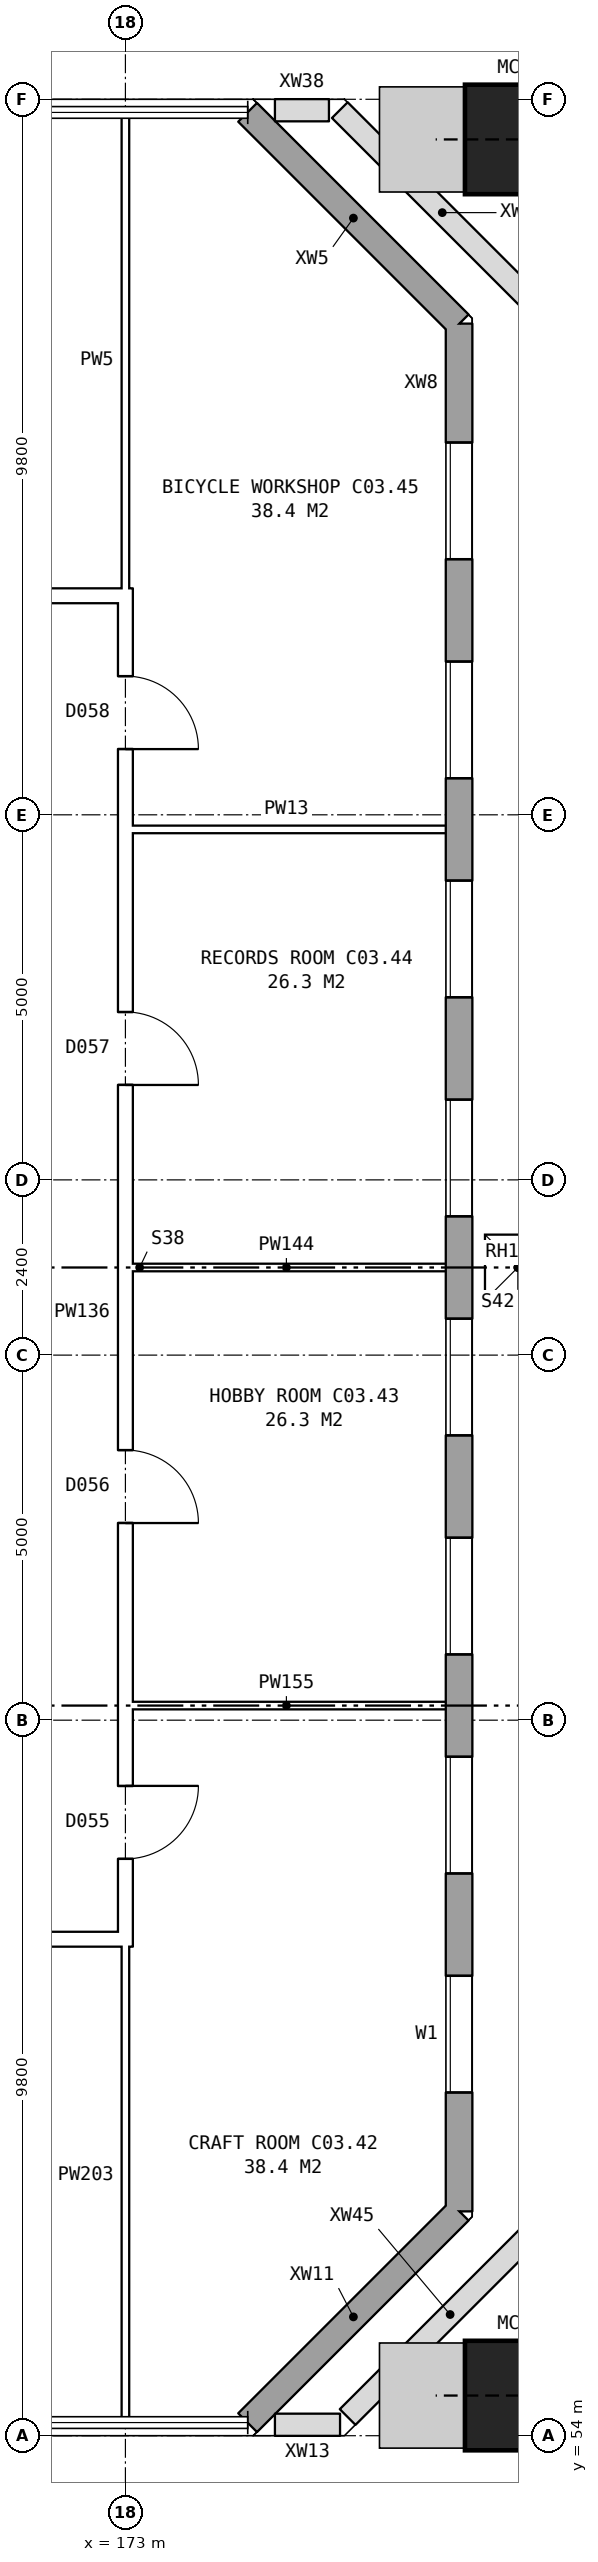
"""IFC4 building model, lengths in metres.
Left out: names, types, materials, properties, quantities, classifications, styles, units other than length and angle.
Written with IfcOpenShell. Run it as: python <this file> out.ifc"""

import sys

from ifc_helpers import new_model, si_unit, direction, frame, frame_2d, origin, origin_2d, place, context, subcontext, project, spatial, rectangle, hollow_rectangle, extrude, element, fill, save


model = new_model("IFC4")
c1 = context("Model", 3, precision=1e-05, world=origin(), true_north=direction((0.0, 1.0)))
c2 = subcontext(c1, "Body", "Model", "MODEL_VIEW")
j1 = project(units=[si_unit("LENGTHUNIT", "METRE"), si_unit("PLANEANGLEUNIT", "RADIAN")], contexts=[c1])
p1 = place(None, origin())
s1 = spatial("IfcSite", under=j1, at=p1, CompositionType="ELEMENT")
p2 = place(p1, origin())
s2 = spatial("IfcBuilding", under=s1, at=p2, CompositionType="ELEMENT")
p3 = place(p2, frame((0.0, 0.0, 14.7)))
s3 = spatial("IfcBuildingStorey", under=s2, at=p3, CompositionType="ELEMENT", Elevation=14.7)
for number, where, z_axis, x_axis in (
    (1, (178.401, 54.55, 0.189), (-0.252, 0.0, 0.968), (0.0, -1.0, 0.0)),
    (2, (178.401, 85.45, 0.189), (-0.252, 0.0, 0.968), (0.0, -1.0, 0.0)),
):
    element("IfcColumn", number, at=place(p3, frame(where, z_axis=z_axis, x_axis=x_axis)), inside=s3, PredefinedType="COLUMN", context=c2, shape_type="SweptSolid", body=[
        extrude(hollow_rectangle(XDim=1.5, YDim=1.5, WallThickness=0.08, at=origin_2d()), origin(), (0.0, 0.0, 1.0), 4.57),
    ])
p4 = place(p3, frame((174.675, 54.18, 0.0), z_axis=(0.0, 0.0, 1.0), x_axis=(0.707106781187, 0.707106781187, 0.0)))
e3 = element("IfcWall", 3, at=p4, inside=s3, PredefinedType="STANDARD", context=c2, shape_type="SweptSolid", body=[
    extrude(rectangle(XDim=4.094, YDim=0.36, at=frame_2d((2.047, 0.0))), origin(), (0.0, 0.0, 1.0), 4.0),
])
p5 = place(p3, frame((177.57, 57.075, 0.0), z_axis=(0.0, 0.0, 1.0), x_axis=(0.0, 1.0, 0.0)))
e4 = element("IfcWall", 4, at=p5, inside=s3, PredefinedType="STANDARD", context=c2, shape_type="SweptSolid", body=[
    extrude(rectangle(XDim=25.851, YDim=0.36, at=frame_2d((12.925, 0.0))), origin(), (0.0, 0.0, 1.0), 4.0),
])
p6 = place(p5, frame((1.625, 0.0, 0.8)))
e5 = element("IfcOpeningElement", 5, at=p6, cuts=e4, PredefinedType="OPENING", context=c2, shape_type="SweptSolid", body=[
    extrude(rectangle(XDim=1.6, YDim=1.8, at=frame_2d((0.8, 0.9))), frame((0.0, 0.19, 0.0), z_axis=(0.0, -1.0, 0.0), x_axis=(1.0, 0.0, 0.0)), (0.0, 0.0, 1.0), 0.38),
])
p7 = place(p5, frame((4.625, 0.0, 0.8)))
e6 = element("IfcOpeningElement", 6, at=p7, cuts=e4, PredefinedType="OPENING", context=c2, shape_type="SweptSolid", body=[
    extrude(rectangle(XDim=1.6, YDim=1.8, at=frame_2d((0.8, 0.9))), frame((0.0, 0.19, 0.0), z_axis=(0.0, -1.0, 0.0), x_axis=(1.0, 0.0, 0.0)), (0.0, 0.0, 1.0), 0.38),
])
p8 = place(p5, frame((7.625, 0.0, 0.8)))
e7 = element("IfcOpeningElement", 7, at=p8, cuts=e4, PredefinedType="OPENING", context=c2, shape_type="SweptSolid", body=[
    extrude(rectangle(XDim=1.6, YDim=1.8, at=frame_2d((0.8, 0.9))), frame((0.0, 0.19, 0.0), z_axis=(0.0, -1.0, 0.0), x_axis=(1.0, 0.0, 0.0)), (0.0, 0.0, 1.0), 0.38),
])
p9 = place(p5, frame((10.625, 0.0, 0.8)))
e8 = element("IfcOpeningElement", 8, at=p9, cuts=e4, PredefinedType="OPENING", context=c2, shape_type="SweptSolid", body=[
    extrude(rectangle(XDim=1.6, YDim=1.8, at=frame_2d((0.8, 0.9))), frame((0.0, 0.19, 0.0), z_axis=(0.0, -1.0, 0.0), x_axis=(1.0, 0.0, 0.0)), (0.0, 0.0, 1.0), 0.38),
])
p10 = place(p5, frame((13.625, 0.0, 0.8)))
e9 = element("IfcOpeningElement", 9, at=p10, cuts=e4, PredefinedType="OPENING", context=c2, shape_type="SweptSolid", body=[
    extrude(rectangle(XDim=1.6, YDim=1.8, at=frame_2d((0.8, 0.9))), frame((0.0, 0.19, 0.0), z_axis=(0.0, -1.0, 0.0), x_axis=(1.0, 0.0, 0.0)), (0.0, 0.0, 1.0), 0.38),
])
p11 = place(p5, frame((16.625, 0.0, 0.8)))
e10 = element("IfcOpeningElement", 10, at=p11, cuts=e4, PredefinedType="OPENING", context=c2, shape_type="SweptSolid", body=[
    extrude(rectangle(XDim=1.6, YDim=1.8, at=frame_2d((0.8, 0.9))), frame((0.0, 0.19, 0.0), z_axis=(0.0, -1.0, 0.0), x_axis=(1.0, 0.0, 0.0)), (0.0, 0.0, 1.0), 0.38),
])
p12 = place(p5, frame((19.625, 0.0, 0.8)))
e11 = element("IfcOpeningElement", 11, at=p12, cuts=e4, PredefinedType="OPENING", context=c2, shape_type="SweptSolid", body=[
    extrude(rectangle(XDim=1.6, YDim=1.8, at=frame_2d((0.8, 0.9))), frame((0.0, 0.19, 0.0), z_axis=(0.0, -1.0, 0.0), x_axis=(1.0, 0.0, 0.0)), (0.0, 0.0, 1.0), 0.38),
])
p13 = place(p5, frame((22.625, 0.0, 0.8)))
e12 = element("IfcOpeningElement", 12, at=p13, cuts=e4, PredefinedType="OPENING", context=c2, shape_type="SweptSolid", body=[
    extrude(rectangle(XDim=1.6, YDim=1.8, at=frame_2d((0.8, 0.9))), frame((0.0, 0.19, 0.0), z_axis=(0.0, -1.0, 0.0), x_axis=(1.0, 0.0, 0.0)), (0.0, 0.0, 1.0), 0.38),
])
p14 = place(p3, frame((177.57, 82.925, 0.0), z_axis=(0.0, 0.0, 1.0), x_axis=(-0.707106781187, 0.707106781187, 0.0)))
e13 = element("IfcWall", 13, at=p14, inside=s3, PredefinedType="STANDARD", context=c2, shape_type="SweptSolid", body=[
    extrude(rectangle(XDim=4.094, YDim=0.36, at=frame_2d((2.047, 0.0))), origin(), (0.0, 0.0, 1.0), 4.0),
])
p15 = place(p3, frame((175.05, 54.15, 0.0), z_axis=(0.0, 0.0, 1.0), x_axis=(1.0, 0.0, 0.0)))
e14 = element("IfcWall", 14, at=p15, inside=s3, PredefinedType="PARAPET", context=c2, shape_type="SweptSolid", body=[
    extrude(rectangle(XDim=0.888, YDim=0.3, at=frame_2d((0.444, 0.0))), origin(), (0.0, 0.0, 1.0), 1.1),
])
for number, where, z_axis, x_axis in (
    (15, (176.045, 54.258, 0.0), (0.0, 0.0, 1.0), (0.707, 0.707, 0.0)),
    (16, (178.742, 83.045, 0.0), (0.0, 0.0, 1.0), (-0.707, 0.707, 0.0)),
):
    element("IfcWall", number, at=place(p3, frame(where, z_axis=z_axis, x_axis=x_axis)), inside=s3, PredefinedType="PARAPET", context=c2, shape_type="SweptSolid", body=[
        extrude(rectangle(XDim=3.966, YDim=0.3, at=frame_2d((1.983, 0.0))), origin(), (0.0, 0.0, 1.0), 1.1),
    ])
p16 = place(p3, frame((175.786, 85.85, 0.0), z_axis=(0.0, 0.0, 1.0), x_axis=(-1.0, 0.0, 0.0)))
e17 = element("IfcWall", 17, at=p16, inside=s3, PredefinedType="PARAPET", context=c2, shape_type="SweptSolid", body=[
    extrude(rectangle(XDim=0.736, YDim=0.3, at=frame_2d((0.368, 0.0))), origin(), (0.0, 0.0, 1.0), 1.1),
])
p17 = place(p3, frame((131.24, 60.8, 0.0), z_axis=(0.0, 0.0, 1.0), x_axis=(1.0, 0.0, 0.0)))
e18 = element("IfcWall", 18, at=p17, inside=s3, PredefinedType="PARTITIONING", context=c2, shape_type="SweptSolid", body=[
    extrude(rectangle(XDim=41.86, YDim=0.2, at=frame_2d((20.93, 0.0))), origin(), (0.0, 0.0, 1.0), 4.0),
])
p18 = place(p17, frame((2.44, 0.0, 0.0)))
e19 = element("IfcOpeningElement", 19, at=p18, cuts=e18, PredefinedType="OPENING", context=c2, shape_type="SweptSolid", body=[
    extrude(rectangle(XDim=1.0, YDim=2.1, at=frame_2d((0.5, 1.05))), frame((0.0, 0.11, 0.0), z_axis=(0.0, -1.0, 0.0), x_axis=(1.0, 0.0, 0.0)), (0.0, 0.0, 1.0), 0.22),
])
p19 = place(p17, frame((7.935, 0.0, 0.0)))
e20 = element("IfcOpeningElement", 20, at=p19, cuts=e18, PredefinedType="OPENING", context=c2, shape_type="SweptSolid", body=[
    extrude(rectangle(XDim=1.0, YDim=2.1, at=frame_2d((0.5, 1.05))), frame((0.0, 0.11, 0.0), z_axis=(0.0, -1.0, 0.0), x_axis=(1.0, 0.0, 0.0)), (0.0, 0.0, 1.0), 0.22),
])
p20 = place(p17, frame((13.835, 0.0, 0.0)))
e21 = element("IfcOpeningElement", 21, at=p20, cuts=e18, PredefinedType="OPENING", context=c2, shape_type="SweptSolid", body=[
    extrude(rectangle(XDim=1.2, YDim=2.1, at=frame_2d((0.6, 1.05))), frame((0.0, 0.11, 0.0), z_axis=(0.0, -1.0, 0.0), x_axis=(1.0, 0.0, 0.0)), (0.0, 0.0, 1.0), 0.22),
])
p21 = place(p17, frame((20.16, 0.0, 0.0)))
e22 = element("IfcOpeningElement", 22, at=p21, cuts=e18, PredefinedType="OPENING", context=c2, shape_type="SweptSolid", body=[
    extrude(rectangle(XDim=1.2, YDim=2.1, at=frame_2d((0.6, 1.05))), frame((0.0, 0.11, 0.0), z_axis=(0.0, -1.0, 0.0), x_axis=(1.0, 0.0, 0.0)), (0.0, 0.0, 1.0), 0.22),
])
p22 = place(p17, frame((26.26, 0.0, 0.0)))
e23 = element("IfcOpeningElement", 23, at=p22, cuts=e18, PredefinedType="OPENING", context=c2, shape_type="SweptSolid", body=[
    extrude(rectangle(XDim=1.0, YDim=2.1, at=frame_2d((0.5, 1.05))), frame((0.0, 0.11, 0.0), z_axis=(0.0, -1.0, 0.0), x_axis=(1.0, 0.0, 0.0)), (0.0, 0.0, 1.0), 0.22),
])
p23 = place(p17, frame((32.26, 0.0, 0.0)))
e24 = element("IfcOpeningElement", 24, at=p23, cuts=e18, PredefinedType="OPENING", context=c2, shape_type="SweptSolid", body=[
    extrude(rectangle(XDim=1.0, YDim=2.1, at=frame_2d((0.5, 1.05))), frame((0.0, 0.11, 0.0), z_axis=(0.0, -1.0, 0.0), x_axis=(1.0, 0.0, 0.0)), (0.0, 0.0, 1.0), 0.22),
])
p24 = place(p17, frame((38.26, 0.0, 0.0)))
e25 = element("IfcOpeningElement", 25, at=p24, cuts=e18, PredefinedType="OPENING", context=c2, shape_type="SweptSolid", body=[
    extrude(rectangle(XDim=1.0, YDim=2.1, at=frame_2d((0.5, 1.05))), frame((0.0, 0.11, 0.0), z_axis=(0.0, -1.0, 0.0), x_axis=(1.0, 0.0, 0.0)), (0.0, 0.0, 1.0), 0.22),
])
for number, where, z_axis, x_axis in (
    (26, (172.9, 64.0, 0.0), (0.0, 0.0, 1.0), (1.0, 0.0, 0.0)),
    (27, (172.9, 70.0, 0.0), (0.0, 0.0, 1.0), (1.0, 0.0, 0.0)),
    (28, (172.9, 76.0, 0.0), (0.0, 0.0, 1.0), (1.0, 0.0, 0.0)),
):
    element("IfcWall", number, at=place(p3, frame(where, z_axis=z_axis, x_axis=x_axis)), inside=s3, PredefinedType="PARTITIONING", context=c2, shape_type="SweptSolid", body=[
        extrude(rectangle(XDim=4.61, YDim=0.1, at=frame_2d((2.305, 0.0))), origin(), (0.0, 0.0, 1.0), 4.0),
    ])
p25 = place(p3, frame((131.24, 79.2, 0.0), z_axis=(0.0, 0.0, 1.0), x_axis=(1.0, 0.0, 0.0)))
e29 = element("IfcWall", 29, at=p25, inside=s3, PredefinedType="PARTITIONING", context=c2, shape_type="SweptSolid", body=[
    extrude(rectangle(XDim=41.86, YDim=0.2, at=frame_2d((20.93, 0.0))), origin(), (0.0, 0.0, 1.0), 4.0),
])
p26 = place(p25, frame((0.94, 0.0, 0.0)))
e30 = element("IfcOpeningElement", 30, at=p26, cuts=e29, PredefinedType="OPENING", context=c2, shape_type="SweptSolid", body=[
    extrude(rectangle(XDim=1.0, YDim=2.1, at=frame_2d((0.5, 1.05))), frame((0.0, 0.11, 0.0), z_axis=(0.0, -1.0, 0.0), x_axis=(1.0, 0.0, 0.0)), (0.0, 0.0, 1.0), 0.22),
])
p27 = place(p25, frame((3.76, 0.0, 0.0)))
e31 = element("IfcOpeningElement", 31, at=p27, cuts=e29, PredefinedType="OPENING", context=c2, shape_type="SweptSolid", body=[
    extrude(rectangle(XDim=1.0, YDim=2.1, at=frame_2d((0.5, 1.05))), frame((0.0, 0.11, 0.0), z_axis=(0.0, -1.0, 0.0), x_axis=(1.0, 0.0, 0.0)), (0.0, 0.0, 1.0), 0.22),
])
p28 = place(p25, frame((6.51, 0.0, 0.0)))
e32 = element("IfcOpeningElement", 32, at=p28, cuts=e29, PredefinedType="OPENING", context=c2, shape_type="SweptSolid", body=[
    extrude(rectangle(XDim=1.0, YDim=2.1, at=frame_2d((0.5, 1.05))), frame((0.0, 0.11, 0.0), z_axis=(0.0, -1.0, 0.0), x_axis=(1.0, 0.0, 0.0)), (0.0, 0.0, 1.0), 0.22),
])
p29 = place(p25, frame((9.185, 0.0, 0.0)))
e33 = element("IfcOpeningElement", 33, at=p29, cuts=e29, PredefinedType="OPENING", context=c2, shape_type="SweptSolid", body=[
    extrude(rectangle(XDim=1.0, YDim=2.1, at=frame_2d((0.5, 1.05))), frame((0.0, 0.11, 0.0), z_axis=(0.0, -1.0, 0.0), x_axis=(1.0, 0.0, 0.0)), (0.0, 0.0, 1.0), 0.22),
])
p30 = place(p25, frame((13.935, 0.0, 0.0)))
e34 = element("IfcOpeningElement", 34, at=p30, cuts=e29, PredefinedType="OPENING", context=c2, shape_type="SweptSolid", body=[
    extrude(rectangle(XDim=1.0, YDim=2.1, at=frame_2d((0.5, 1.05))), frame((0.0, 0.11, 0.0), z_axis=(0.0, -1.0, 0.0), x_axis=(1.0, 0.0, 0.0)), (0.0, 0.0, 1.0), 0.22),
])
p31 = place(p25, frame((20.26, 0.0, 0.0)))
e35 = element("IfcOpeningElement", 35, at=p31, cuts=e29, PredefinedType="OPENING", context=c2, shape_type="SweptSolid", body=[
    extrude(rectangle(XDim=1.0, YDim=2.1, at=frame_2d((0.5, 1.05))), frame((0.0, 0.11, 0.0), z_axis=(0.0, -1.0, 0.0), x_axis=(1.0, 0.0, 0.0)), (0.0, 0.0, 1.0), 0.22),
])
p32 = place(p25, frame((26.26, 0.0, 0.0)))
e36 = element("IfcOpeningElement", 36, at=p32, cuts=e29, PredefinedType="OPENING", context=c2, shape_type="SweptSolid", body=[
    extrude(rectangle(XDim=1.0, YDim=2.1, at=frame_2d((0.5, 1.05))), frame((0.0, 0.11, 0.0), z_axis=(0.0, -1.0, 0.0), x_axis=(1.0, 0.0, 0.0)), (0.0, 0.0, 1.0), 0.22),
])
p33 = place(p25, frame((32.26, 0.0, 0.0)))
e37 = element("IfcOpeningElement", 37, at=p33, cuts=e29, PredefinedType="OPENING", context=c2, shape_type="SweptSolid", body=[
    extrude(rectangle(XDim=1.0, YDim=2.1, at=frame_2d((0.5, 1.05))), frame((0.0, 0.11, 0.0), z_axis=(0.0, -1.0, 0.0), x_axis=(1.0, 0.0, 0.0)), (0.0, 0.0, 1.0), 0.22),
])
p34 = place(p25, frame((38.26, 0.0, 0.0)))
e38 = element("IfcOpeningElement", 38, at=p34, cuts=e29, PredefinedType="OPENING", context=c2, shape_type="SweptSolid", body=[
    extrude(rectangle(XDim=1.0, YDim=2.1, at=frame_2d((0.5, 1.05))), frame((0.0, 0.11, 0.0), z_axis=(0.0, -1.0, 0.0), x_axis=(1.0, 0.0, 0.0)), (0.0, 0.0, 1.0), 0.22),
])
p35 = place(p3, frame((173.0, 60.7, 0.0), z_axis=(0.0, 0.0, 1.0), x_axis=(0.0, 1.0, 0.0)))
e39 = element("IfcWall", 39, at=p35, inside=s3, PredefinedType="PARTITIONING", context=c2, shape_type="SweptSolid", body=[
    extrude(rectangle(XDim=18.6, YDim=0.2, at=frame_2d((9.3, 0.0))), origin(), (0.0, 0.0, 1.0), 4.0),
])
p36 = place(p35, frame((1.2, 0.0, 0.0)))
e40 = element("IfcOpeningElement", 40, at=p36, cuts=e39, PredefinedType="OPENING", context=c2, shape_type="SweptSolid", body=[
    extrude(rectangle(XDim=1.0, YDim=2.1, at=frame_2d((0.5, 1.05))), frame((0.0, 0.11, 0.0), z_axis=(0.0, -1.0, 0.0), x_axis=(1.0, 0.0, 0.0)), (0.0, 0.0, 1.0), 0.22),
])
p37 = place(p35, frame((5.8, 0.0, 0.0)))
e41 = element("IfcOpeningElement", 41, at=p37, cuts=e39, PredefinedType="OPENING", context=c2, shape_type="SweptSolid", body=[
    extrude(rectangle(XDim=1.0, YDim=2.1, at=frame_2d((0.5, 1.05))), frame((0.0, 0.11, 0.0), z_axis=(0.0, -1.0, 0.0), x_axis=(1.0, 0.0, 0.0)), (0.0, 0.0, 1.0), 0.22),
])
p38 = place(p35, frame((11.8, 0.0, 0.0)))
e42 = element("IfcOpeningElement", 42, at=p38, cuts=e39, PredefinedType="OPENING", context=c2, shape_type="SweptSolid", body=[
    extrude(rectangle(XDim=1.0, YDim=2.1, at=frame_2d((0.5, 1.05))), frame((0.0, 0.11, 0.0), z_axis=(0.0, -1.0, 0.0), x_axis=(1.0, 0.0, 0.0)), (0.0, 0.0, 1.0), 0.22),
])
p39 = place(p35, frame((16.4, 0.0, 0.0)))
e43 = element("IfcOpeningElement", 43, at=p39, cuts=e39, PredefinedType="OPENING", context=c2, shape_type="SweptSolid", body=[
    extrude(rectangle(XDim=1.0, YDim=2.1, at=frame_2d((0.5, 1.05))), frame((0.0, 0.11, 0.0), z_axis=(0.0, -1.0, 0.0), x_axis=(1.0, 0.0, 0.0)), (0.0, 0.0, 1.0), 0.22),
])
for number, where, z_axis, x_axis in (
    (44, (173.0, 54.24, 0.0), (0.0, 0.0, 1.0), (0.0, 1.0, 0.0)),
    (45, (173.0, 79.1, 0.0), (0.0, 0.0, 1.0), (0.0, 1.0, 0.0)),
):
    element("IfcWall", number, at=place(p3, frame(where, z_axis=z_axis, x_axis=x_axis)), inside=s3, PredefinedType="PARTITIONING", context=c2, shape_type="SweptSolid", body=[
        extrude(rectangle(XDim=6.66, YDim=0.1, at=frame_2d((3.33, 0.0))), origin(), (0.0, 0.0, 1.0), 4.0),
    ])
p40 = place(p6, origin())
e46 = element("IfcWindow", 46, at=p40, inside=s3, PartitioningType="SINGLE_PANEL", PredefinedType="WINDOW", context=c2, shape_type="SweptSolid", body=[
    extrude(rectangle(XDim=1.6, YDim=1.8, at=frame_2d((0.8, 0.9))), frame((0.0, 0.15, 0.0), z_axis=(0.0, -1.0, 0.0), x_axis=(1.0, 0.0, 0.0)), (0.0, 0.0, 1.0), 0.06),
])
fill(e5, e46)
p41 = place(p7, origin())
e47 = element("IfcWindow", 47, at=p41, inside=s3, PartitioningType="SINGLE_PANEL", PredefinedType="WINDOW", context=c2, shape_type="SweptSolid", body=[
    extrude(rectangle(XDim=1.6, YDim=1.8, at=frame_2d((0.8, 0.9))), frame((0.0, 0.15, 0.0), z_axis=(0.0, -1.0, 0.0), x_axis=(1.0, 0.0, 0.0)), (0.0, 0.0, 1.0), 0.06),
])
fill(e6, e47)
p42 = place(p8, origin())
e48 = element("IfcWindow", 48, at=p42, inside=s3, PartitioningType="SINGLE_PANEL", PredefinedType="WINDOW", context=c2, shape_type="SweptSolid", body=[
    extrude(rectangle(XDim=1.6, YDim=1.8, at=frame_2d((0.8, 0.9))), frame((0.0, 0.15, 0.0), z_axis=(0.0, -1.0, 0.0), x_axis=(1.0, 0.0, 0.0)), (0.0, 0.0, 1.0), 0.06),
])
fill(e7, e48)
p43 = place(p9, origin())
e49 = element("IfcWindow", 49, at=p43, inside=s3, PartitioningType="SINGLE_PANEL", PredefinedType="WINDOW", context=c2, shape_type="SweptSolid", body=[
    extrude(rectangle(XDim=1.6, YDim=1.8, at=frame_2d((0.8, 0.9))), frame((0.0, 0.15, 0.0), z_axis=(0.0, -1.0, 0.0), x_axis=(1.0, 0.0, 0.0)), (0.0, 0.0, 1.0), 0.06),
])
fill(e8, e49)
p44 = place(p10, origin())
e50 = element("IfcWindow", 50, at=p44, inside=s3, PartitioningType="SINGLE_PANEL", PredefinedType="WINDOW", context=c2, shape_type="SweptSolid", body=[
    extrude(rectangle(XDim=1.6, YDim=1.8, at=frame_2d((0.8, 0.9))), frame((0.0, 0.15, 0.0), z_axis=(0.0, -1.0, 0.0), x_axis=(1.0, 0.0, 0.0)), (0.0, 0.0, 1.0), 0.06),
])
fill(e9, e50)
p45 = place(p11, origin())
e51 = element("IfcWindow", 51, at=p45, inside=s3, PartitioningType="SINGLE_PANEL", PredefinedType="WINDOW", context=c2, shape_type="SweptSolid", body=[
    extrude(rectangle(XDim=1.6, YDim=1.8, at=frame_2d((0.8, 0.9))), frame((0.0, 0.15, 0.0), z_axis=(0.0, -1.0, 0.0), x_axis=(1.0, 0.0, 0.0)), (0.0, 0.0, 1.0), 0.06),
])
fill(e10, e51)
p46 = place(p12, origin())
e52 = element("IfcWindow", 52, at=p46, inside=s3, PartitioningType="SINGLE_PANEL", PredefinedType="WINDOW", context=c2, shape_type="SweptSolid", body=[
    extrude(rectangle(XDim=1.6, YDim=1.8, at=frame_2d((0.8, 0.9))), frame((0.0, 0.15, 0.0), z_axis=(0.0, -1.0, 0.0), x_axis=(1.0, 0.0, 0.0)), (0.0, 0.0, 1.0), 0.06),
])
fill(e11, e52)
p47 = place(p13, origin())
e53 = element("IfcWindow", 53, at=p47, inside=s3, PartitioningType="SINGLE_PANEL", PredefinedType="WINDOW", context=c2, shape_type="SweptSolid", body=[
    extrude(rectangle(XDim=1.6, YDim=1.8, at=frame_2d((0.8, 0.9))), frame((0.0, 0.15, 0.0), z_axis=(0.0, -1.0, 0.0), x_axis=(1.0, 0.0, 0.0)), (0.0, 0.0, 1.0), 0.06),
])
fill(e12, e53)
p48 = place(p3, frame((0.0, 0.0, -0.3)))
p49 = place(p48, frame((178.375, 70.0, 0.0)))
p50 = place(p49, frame((0.0, 0.0, 0.25)))
e54 = element("IfcWindow", 54, at=p50, inside=s3, PartitioningType="SINGLE_PANEL", PredefinedType="SKYLIGHT", context=c2, shape_type="SweptSolid", body=[
    extrude(rectangle(XDim=0.9, YDim=0.9, at=origin_2d()), origin(), (0.0, 0.0, 1.0), 0.05),
])
p51 = place(p36, frame((1.0, 0.0, 0.0), z_axis=(0.0, 0.0, 1.0), x_axis=(-1.0, 0.0, 0.0)))
e55 = element("IfcDoor", 55, at=p51, inside=s3, OperationType="SINGLE_SWING_LEFT", PredefinedType="DOOR", context=c2, shape_type="SweptSolid", body=[
    extrude(rectangle(XDim=1.0, YDim=2.1, at=frame_2d((0.5, 1.05))), frame((0.0, 0.025, 0.0), z_axis=(0.0, -1.0, 0.0), x_axis=(1.0, 0.0, 0.0)), (0.0, 0.0, 1.0), 0.05),
])
fill(e40, e55)
p52 = place(p37, frame((1.0, 0.0, 0.0), z_axis=(0.0, 0.0, 1.0), x_axis=(-1.0, 0.0, 0.0)))
e56 = element("IfcDoor", 56, at=p52, inside=s3, OperationType="SINGLE_SWING_RIGHT", PredefinedType="DOOR", context=c2, shape_type="SweptSolid", body=[
    extrude(rectangle(XDim=1.0, YDim=2.1, at=frame_2d((0.5, 1.05))), frame((0.0, 0.025, 0.0), z_axis=(0.0, -1.0, 0.0), x_axis=(1.0, 0.0, 0.0)), (0.0, 0.0, 1.0), 0.05),
])
fill(e41, e56)
p53 = place(p38, frame((1.0, 0.0, 0.0), z_axis=(0.0, 0.0, 1.0), x_axis=(-1.0, 0.0, 0.0)))
e57 = element("IfcDoor", 57, at=p53, inside=s3, OperationType="SINGLE_SWING_RIGHT", PredefinedType="DOOR", context=c2, shape_type="SweptSolid", body=[
    extrude(rectangle(XDim=1.0, YDim=2.1, at=frame_2d((0.5, 1.05))), frame((0.0, 0.025, 0.0), z_axis=(0.0, -1.0, 0.0), x_axis=(1.0, 0.0, 0.0)), (0.0, 0.0, 1.0), 0.05),
])
fill(e42, e57)
p54 = place(p39, frame((1.0, 0.0, 0.0), z_axis=(0.0, 0.0, 1.0), x_axis=(-1.0, 0.0, 0.0)))
e58 = element("IfcDoor", 58, at=p54, inside=s3, OperationType="SINGLE_SWING_RIGHT", PredefinedType="DOOR", context=c2, shape_type="SweptSolid", body=[
    extrude(rectangle(XDim=1.0, YDim=2.1, at=frame_2d((0.5, 1.05))), frame((0.0, 0.025, 0.0), z_axis=(0.0, -1.0, 0.0), x_axis=(1.0, 0.0, 0.0)), (0.0, 0.0, 1.0), 0.05),
])
fill(e43, e58)
save(model, sys.argv[1])
